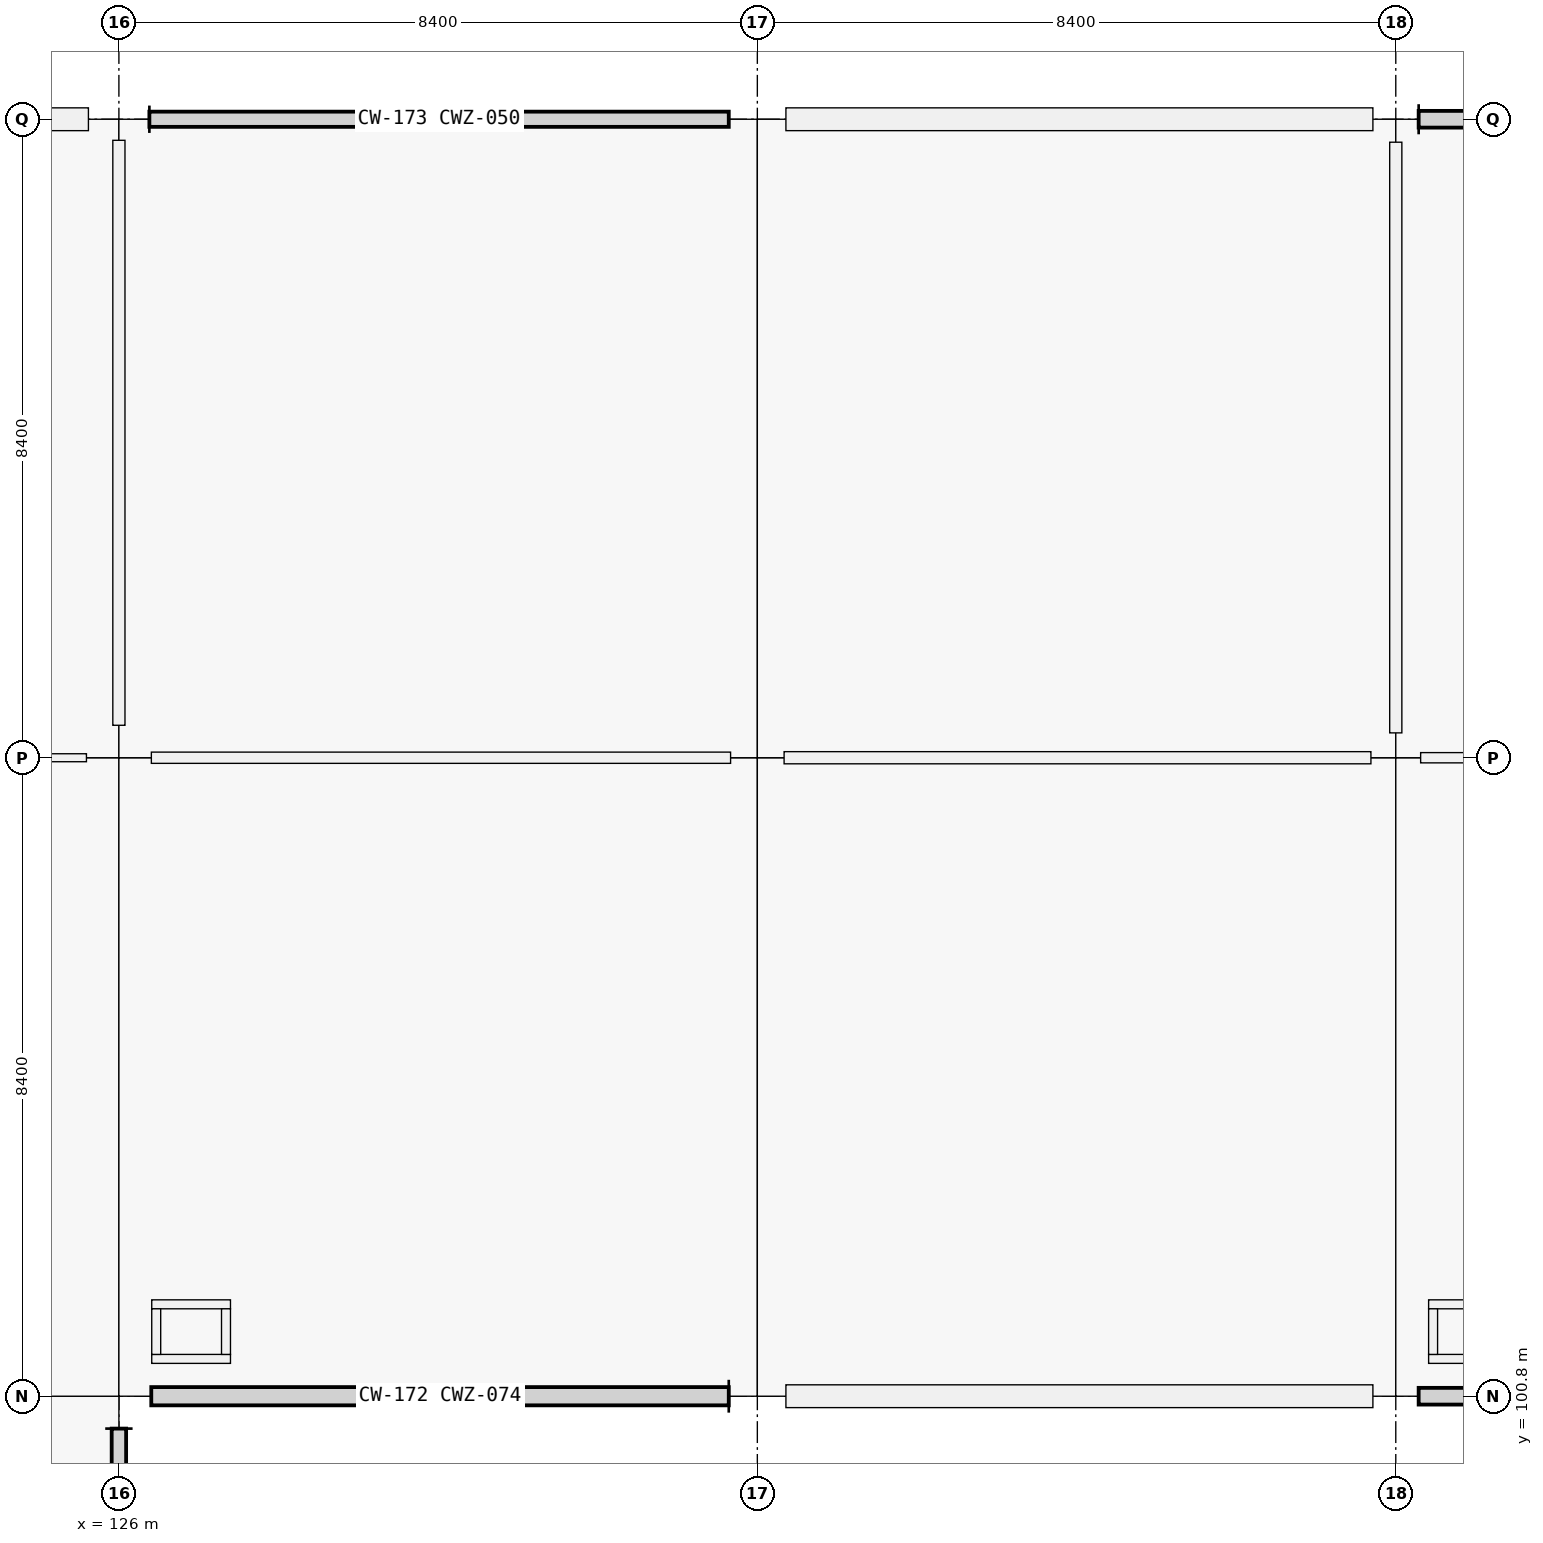
"""IFC4 building model, lengths in metres.
Left out: names, types, materials, properties, quantities, classifications, styles, units other than length and angle.
Written with IfcOpenShell. Run it as: python <this file> out.ifc"""

import sys

from ifc_helpers import new_model, si_unit, direction, frame, frame_2d, origin, origin_2d, place, context, subcontext, project, spatial, rectangle, extrude, element, fill, save


model = new_model("IFC4")
c1 = context("Model", 3, precision=1e-05, world=origin(), true_north=direction((0.0, 1.0)))
c2 = subcontext(c1, "Body", "Model", "MODEL_VIEW")
j1 = project(units=[si_unit("LENGTHUNIT", "METRE"), si_unit("PLANEANGLEUNIT", "RADIAN")], contexts=[c1])
p1 = place(None, origin())
s1 = spatial("IfcSite", under=j1, at=p1, CompositionType="ELEMENT")
p2 = place(p1, origin())
s2 = spatial("IfcBuilding", under=s1, at=p2, CompositionType="ELEMENT")
p3 = place(p2, frame((0.0, 0.0, 10.26)))
s3 = spatial("IfcBuildingStorey", under=s2, at=p3, CompositionType="ELEMENT", Elevation=10.26)
for number, where, z_axis, x_axis in (
    (1, (126.0, 100.8, 0.0), (0.0, 0.0, 1.0), (1.0, 0.0, 0.0)),
    (2, (126.0, 109.2, 0.0), (0.0, 0.0, 1.0), (1.0, 0.0, 0.0)),
):
    element("IfcColumn", number, at=place(p3, frame(where, z_axis=z_axis, x_axis=x_axis)), inside=s3, PredefinedType="COLUMN", context=c2, shape_type="SweptSolid", body=[
        extrude(rectangle(XDim=0.85, YDim=0.85, at=origin_2d()), origin(), (0.0, 0.0, 1.0), 4.5),
    ])
p4 = place(p3, frame((126.0, 117.6, 0.0), z_axis=(0.0, 0.0, 1.0), x_axis=(1.0, 0.0, 0.0)))
e3 = element("IfcColumn", 3, at=p4, inside=s3, PredefinedType="COLUMN", context=c2, shape_type="SweptSolid", body=[
    extrude(rectangle(XDim=0.8, YDim=0.55, at=origin_2d()), origin(), (0.0, 0.0, 1.0), 4.5),
])
p5 = place(p3, frame((134.4, 100.8, 0.0), z_axis=(0.0, 0.0, 1.0), x_axis=(1.0, 0.0, 0.0)))
e4 = element("IfcColumn", 4, at=p5, inside=s3, PredefinedType="COLUMN", context=c2, shape_type="SweptSolid", body=[
    extrude(rectangle(XDim=0.75, YDim=0.75, at=origin_2d()), origin(), (0.0, 0.0, 1.0), 4.5),
])
p6 = place(p3, frame((134.4, 109.2, 0.0), z_axis=(0.0, 0.0, 1.0), x_axis=(1.0, 0.0, 0.0)))
e5 = element("IfcColumn", 5, at=p6, inside=s3, PredefinedType="COLUMN", context=c2, shape_type="SweptSolid", body=[
    extrude(rectangle(XDim=0.7, YDim=0.7, at=origin_2d()), origin(), (0.0, 0.0, 1.0), 4.5),
])
p7 = place(p3, frame((134.4, 117.6, 0.0), z_axis=(0.0, 0.0, 1.0), x_axis=(1.0, 0.0, 0.0)))
e6 = element("IfcColumn", 6, at=p7, inside=s3, PredefinedType="COLUMN", context=c2, shape_type="SweptSolid", body=[
    extrude(rectangle(XDim=0.75, YDim=0.75, at=origin_2d()), origin(), (0.0, 0.0, 1.0), 4.5),
])
p8 = place(p3, frame((142.8, 100.8, 0.0), z_axis=(0.0, 0.0, 1.0), x_axis=(1.0, 0.0, 0.0)))
e7 = element("IfcColumn", 7, at=p8, inside=s3, PredefinedType="COLUMN", context=c2, shape_type="SweptSolid", body=[
    extrude(rectangle(XDim=0.6, YDim=0.6, at=origin_2d()), origin(), (0.0, 0.0, 1.0), 4.5),
])
p9 = place(p3, frame((142.8, 109.2, 0.0), z_axis=(0.0, 0.0, 1.0), x_axis=(1.0, 0.0, 0.0)))
e8 = element("IfcColumn", 8, at=p9, inside=s3, PredefinedType="COLUMN", context=c2, shape_type="SweptSolid", body=[
    extrude(rectangle(XDim=0.65, YDim=0.65, at=origin_2d()), origin(), (0.0, 0.0, 1.0), 4.5),
])
p10 = place(p3, frame((142.8, 117.6, 0.0), z_axis=(0.0, 0.0, 1.0), x_axis=(1.0, 0.0, 0.0)))
e9 = element("IfcColumn", 9, at=p10, inside=s3, PredefinedType="COLUMN", context=c2, shape_type="SweptSolid", body=[
    extrude(rectangle(XDim=0.6, YDim=0.6, at=origin_2d()), origin(), (0.0, 0.0, 1.0), 4.5),
])
p11 = place(p3, frame((118.001, 117.6, 0.0), z_axis=(0.0, 0.0, 1.0), x_axis=(1.0, 0.0, 0.0)))
e10 = element("IfcWall", 10, at=p11, inside=s3, PredefinedType="SOLIDWALL", context=c2, shape_type="SweptSolid", body=[
    extrude(rectangle(XDim=7.598, YDim=0.3, at=frame_2d((3.799, 0.0))), origin(), (0.0, 0.0, 1.0), 3.54),
])
p12 = place(p11, frame((3.149, 0.0, 0.9)))
e11 = element("IfcOpeningElement", 11, at=p12, cuts=e10, PredefinedType="OPENING", context=c2, shape_type="SweptSolid", body=[
    extrude(rectangle(XDim=1.3, YDim=1.95, at=frame_2d((0.65, 0.975))), frame((0.0, 0.15, 0.0), z_axis=(0.0, -1.0, 0.0), x_axis=(1.0, 0.0, 0.0)), (0.0, 0.0, 1.0), 0.3),
])
p13 = place(p3, frame((142.499, 100.8, 0.0), z_axis=(0.0, 0.0, 1.0), x_axis=(-1.0, 0.0, 0.0)))
e12 = element("IfcWall", 12, at=p13, inside=s3, PredefinedType="SOLIDWALL", context=c2, shape_type="SweptSolid", body=[
    extrude(rectangle(XDim=7.723, YDim=0.3, at=frame_2d((3.862, 0.0))), origin(), (0.0, 0.0, 1.0), 3.54),
])
p14 = place(p13, frame((2.486, 0.0, 0.9)))
e13 = element("IfcOpeningElement", 13, at=p14, cuts=e12, PredefinedType="OPENING", context=c2, shape_type="SweptSolid", body=[
    extrude(rectangle(XDim=2.75, YDim=1.6, at=frame_2d((1.375, 0.8))), frame((0.0, 0.15, 0.0), z_axis=(0.0, -1.0, 0.0), x_axis=(1.0, 0.0, 0.0)), (0.0, 0.0, 1.0), 0.3),
])
p15 = place(p3, frame((134.776, 117.6, 0.0), z_axis=(0.0, 0.0, 1.0), x_axis=(1.0, 0.0, 0.0)))
e14 = element("IfcWall", 14, at=p15, inside=s3, PredefinedType="SOLIDWALL", context=c2, shape_type="SweptSolid", body=[
    extrude(rectangle(XDim=7.723, YDim=0.3, at=frame_2d((3.862, 0.0))), origin(), (0.0, 0.0, 1.0), 3.54),
])
p16 = place(p15, frame((3.087, 0.0, 0.9)))
e15 = element("IfcOpeningElement", 15, at=p16, cuts=e14, PredefinedType="OPENING", context=c2, shape_type="SweptSolid", body=[
    extrude(rectangle(XDim=1.55, YDim=1.6, at=frame_2d((0.775, 0.8))), frame((0.0, 0.15, 0.0), z_axis=(0.0, -1.0, 0.0), x_axis=(1.0, 0.0, 0.0)), (0.0, 0.0, 1.0), 0.3),
])
for number, where, z_axis, x_axis in (
    (16, (126.432, 101.291, 0.0), (0.0, 0.0, 1.0), (1.0, 0.0, 0.0)),
    (17, (126.432, 102.009, 0.0), (0.0, 0.0, 1.0), (1.0, 0.0, 0.0)),
):
    element("IfcWall", number, at=place(p3, frame(where, z_axis=z_axis, x_axis=x_axis)), inside=s3, PredefinedType="PARTITIONING", context=c2, shape_type="SweptSolid", body=[
        extrude(rectangle(XDim=1.036, YDim=0.118, at=frame_2d((0.518, 0.0))), origin(), (0.0, 0.0, 1.0), 3.53),
    ])
for number, where, z_axis, x_axis in (
    (18, (126.491, 101.35, 0.0), (0.0, 0.0, 1.0), (0.0, 1.0, 0.0)),
    (19, (127.409, 101.35, 0.0), (0.0, 0.0, 1.0), (0.0, 1.0, 0.0)),
):
    element("IfcWall", number, at=place(p3, frame(where, z_axis=z_axis, x_axis=x_axis)), inside=s3, PredefinedType="PARTITIONING", context=c2, shape_type="SweptSolid", body=[
        extrude(rectangle(XDim=0.6, YDim=0.118, at=frame_2d((0.3, 0.0))), origin(), (0.0, 0.0, 1.0), 3.53),
    ])
for number, where, z_axis, x_axis in (
    (20, (143.232, 101.291, 0.0), (0.0, 0.0, 1.0), (1.0, 0.0, 0.0)),
    (21, (143.232, 102.009, 0.0), (0.0, 0.0, 1.0), (1.0, 0.0, 0.0)),
):
    element("IfcWall", number, at=place(p3, frame(where, z_axis=z_axis, x_axis=x_axis)), inside=s3, PredefinedType="PARTITIONING", context=c2, shape_type="SweptSolid", body=[
        extrude(rectangle(XDim=1.036, YDim=0.118, at=frame_2d((0.518, 0.0))), origin(), (0.0, 0.0, 1.0), 3.53),
    ])
p17 = place(p3, frame((143.291, 101.35, 0.0), z_axis=(0.0, 0.0, 1.0), x_axis=(0.0, 1.0, 0.0)))
e22 = element("IfcWall", 22, at=p17, inside=s3, PredefinedType="PARTITIONING", context=c2, shape_type="SweptSolid", body=[
    extrude(rectangle(XDim=0.6, YDim=0.118, at=frame_2d((0.3, 0.0))), origin(), (0.0, 0.0, 1.0), 3.53),
])
p18 = place(p3, frame((118.027, 109.2, 0.0), z_axis=(0.0, 0.0, 1.0), x_axis=(1.0, 0.0, 0.0)))
e23 = element("IfcWall", 23, at=p18, inside=s3, PredefinedType="PARTITIONING", context=c2, shape_type="SweptSolid", body=[
    extrude(rectangle(XDim=7.546, YDim=0.105, at=frame_2d((3.773, 0.0))), origin(), (0.0, 0.0, 1.0), 3.37),
])
p19 = place(p18, frame((3.283, 0.0, 0.0)))
e24 = element("IfcOpeningElement", 24, at=p19, cuts=e23, PredefinedType="OPENING", context=c2, shape_type="SweptSolid", body=[
    extrude(rectangle(XDim=0.98, YDim=2.18, at=frame_2d((0.49, 1.09))), frame((0.0, 0.052, 0.0), z_axis=(0.0, -1.0, 0.0), x_axis=(1.0, 0.0, 0.0)), (0.0, 0.0, 1.0), 0.105),
])
p20 = place(p3, frame((126.427, 109.2, 0.0), z_axis=(0.0, 0.0, 1.0), x_axis=(1.0, 0.0, 0.0)))
e25 = element("IfcWall", 25, at=p20, inside=s3, PredefinedType="PARTITIONING", context=c2, shape_type="SweptSolid", body=[
    extrude(rectangle(XDim=7.621, YDim=0.148, at=frame_2d((3.811, 0.0))), origin(), (0.0, 0.0, 1.0), 3.37),
])
p21 = place(p20, frame((3.361, 0.0, 0.0)))
e26 = element("IfcOpeningElement", 26, at=p21, cuts=e25, PredefinedType="OPENING", context=c2, shape_type="SweptSolid", body=[
    extrude(rectangle(XDim=0.9, YDim=2.05, at=frame_2d((0.45, 1.025))), frame((0.0, 0.074, 0.0), z_axis=(0.0, -1.0, 0.0), x_axis=(1.0, 0.0, 0.0)), (0.0, 0.0, 1.0), 0.148),
])
p22 = place(p3, frame((134.752, 109.2, 0.0), z_axis=(0.0, 0.0, 1.0), x_axis=(1.0, 0.0, 0.0)))
e27 = element("IfcWall", 27, at=p22, inside=s3, PredefinedType="PARTITIONING", context=c2, shape_type="SweptSolid", body=[
    extrude(rectangle(XDim=7.721, YDim=0.16, at=frame_2d((3.86, 0.0))), origin(), (0.0, 0.0, 1.0), 3.37),
])
p23 = place(p22, frame((3.061, 0.0, 0.0)))
e28 = element("IfcOpeningElement", 28, at=p23, cuts=e27, PredefinedType="OPENING", context=c2, shape_type="SweptSolid", body=[
    extrude(rectangle(XDim=1.6, YDim=2.2, at=frame_2d((0.8, 1.1))), frame((0.0, 0.08, 0.0), z_axis=(0.0, -1.0, 0.0), x_axis=(1.0, 0.0, 0.0)), (0.0, 0.0, 1.0), 0.16),
])
p24 = place(p3, frame((143.127, 109.2, 0.0), z_axis=(0.0, 0.0, 1.0), x_axis=(1.0, 0.0, 0.0)))
e29 = element("IfcWall", 29, at=p24, inside=s3, PredefinedType="PARTITIONING", context=c2, shape_type="SweptSolid", body=[
    extrude(rectangle(XDim=7.771, YDim=0.135, at=frame_2d((3.885, 0.0))), origin(), (0.0, 0.0, 1.0), 3.37),
])
p25 = place(p24, frame((3.361, 0.0, 0.0)))
e30 = element("IfcOpeningElement", 30, at=p25, cuts=e29, PredefinedType="OPENING", context=c2, shape_type="SweptSolid", body=[
    extrude(rectangle(XDim=1.05, YDim=2.12, at=frame_2d((0.525, 1.06))), frame((0.0, 0.067, 0.0), z_axis=(0.0, -1.0, 0.0), x_axis=(1.0, 0.0, 0.0)), (0.0, 0.0, 1.0), 0.135),
])
p26 = place(p3, frame((126.0, 109.627, 0.0), z_axis=(0.0, 0.0, 1.0), x_axis=(0.0, 1.0, 0.0)))
e31 = element("IfcWall", 31, at=p26, inside=s3, PredefinedType="PARTITIONING", context=c2, shape_type="SweptSolid", body=[
    extrude(rectangle(XDim=7.696, YDim=0.16, at=frame_2d((3.848, 0.0))), origin(), (0.0, 0.0, 1.0), 3.37),
])
p27 = place(p26, frame((3.273, 0.0, 0.0)))
e32 = element("IfcOpeningElement", 32, at=p27, cuts=e31, PredefinedType="OPENING", context=c2, shape_type="SweptSolid", body=[
    extrude(rectangle(XDim=1.15, YDim=2.2, at=frame_2d((0.575, 1.1))), frame((0.0, 0.08, 0.0), z_axis=(0.0, -1.0, 0.0), x_axis=(1.0, 0.0, 0.0)), (0.0, 0.0, 1.0), 0.16),
])
p28 = place(p3, frame((142.8, 109.527, 0.0), z_axis=(0.0, 0.0, 1.0), x_axis=(0.0, 1.0, 0.0)))
e33 = element("IfcWall", 33, at=p28, inside=s3, PredefinedType="PARTITIONING", context=c2, shape_type="SweptSolid", body=[
    extrude(rectangle(XDim=7.771, YDim=0.16, at=frame_2d((3.885, 0.0))), origin(), (0.0, 0.0, 1.0), 3.37),
])
p29 = place(p28, frame((3.335, 0.0, 0.0)))
e34 = element("IfcOpeningElement", 34, at=p29, cuts=e33, PredefinedType="OPENING", context=c2, shape_type="SweptSolid", body=[
    extrude(rectangle(XDim=1.1, YDim=2.15, at=frame_2d((0.55, 1.075))), frame((0.0, 0.08, 0.0), z_axis=(0.0, -1.0, 0.0), x_axis=(1.0, 0.0, 0.0)), (0.0, 0.0, 1.0), 0.16),
])
p30 = place(p14, origin())
e35 = element("IfcWindow", 35, at=p30, inside=s3, PartitioningType="SINGLE_PANEL", PredefinedType="WINDOW", context=c2, shape_type="SweptSolid", body=[
    extrude(rectangle(XDim=2.75, YDim=1.6, at=frame_2d((1.375, 0.8))), frame((0.0, 0.03, 0.0), z_axis=(0.0, -1.0, 0.0), x_axis=(1.0, 0.0, 0.0)), (0.0, 0.0, 1.0), 0.06),
])
fill(e13, e35)
p31 = place(p16, origin())
e36 = element("IfcWindow", 36, at=p31, inside=s3, PartitioningType="SINGLE_PANEL", PredefinedType="WINDOW", context=c2, shape_type="SweptSolid", body=[
    extrude(rectangle(XDim=1.55, YDim=1.6, at=frame_2d((0.775, 0.8))), frame((0.0, 0.03, 0.0), z_axis=(0.0, -1.0, 0.0), x_axis=(1.0, 0.0, 0.0)), (0.0, 0.0, 1.0), 0.06),
])
fill(e15, e36)
p32 = place(p21, origin())
e37 = element("IfcDoor", 37, at=p32, inside=s3, OperationType="SINGLE_SWING_RIGHT", PredefinedType="DOOR", context=c2, shape_type="SweptSolid", body=[
    extrude(rectangle(XDim=0.9, YDim=2.05, at=frame_2d((0.45, 1.025))), frame((0.0, 0.025, 0.0), z_axis=(0.0, -1.0, 0.0), x_axis=(1.0, 0.0, 0.0)), (0.0, 0.0, 1.0), 0.05),
])
fill(e26, e37)
p33 = place(p23, origin())
e38 = element("IfcDoor", 38, at=p33, inside=s3, OperationType="DOUBLE_DOOR_SINGLE_SWING", PredefinedType="DOOR", context=c2, shape_type="SweptSolid", body=[
    extrude(rectangle(XDim=1.6, YDim=2.2, at=frame_2d((0.8, 1.1))), frame((0.0, 0.025, 0.0), z_axis=(0.0, -1.0, 0.0), x_axis=(1.0, 0.0, 0.0)), (0.0, 0.0, 1.0), 0.05),
])
fill(e28, e38)
p34 = place(p27, origin())
e39 = element("IfcDoor", 39, at=p34, inside=s3, OperationType="SINGLE_SWING_RIGHT", PredefinedType="DOOR", context=c2, shape_type="SweptSolid", body=[
    extrude(rectangle(XDim=1.15, YDim=2.2, at=frame_2d((0.575, 1.1))), frame((0.0, 0.025, 0.0), z_axis=(0.0, -1.0, 0.0), x_axis=(1.0, 0.0, 0.0)), (0.0, 0.0, 1.0), 0.05),
])
fill(e32, e39)
p35 = place(p29, origin())
e40 = element("IfcDoor", 40, at=p35, inside=s3, OperationType="SINGLE_SWING_LEFT", PredefinedType="DOOR", context=c2, shape_type="SweptSolid", body=[
    extrude(rectangle(XDim=1.1, YDim=2.15, at=frame_2d((0.55, 1.075))), frame((0.0, 0.025, 0.0), z_axis=(0.0, -1.0, 0.0), x_axis=(1.0, 0.0, 0.0)), (0.0, 0.0, 1.0), 0.05),
])
fill(e34, e40)
save(model, sys.argv[1])
